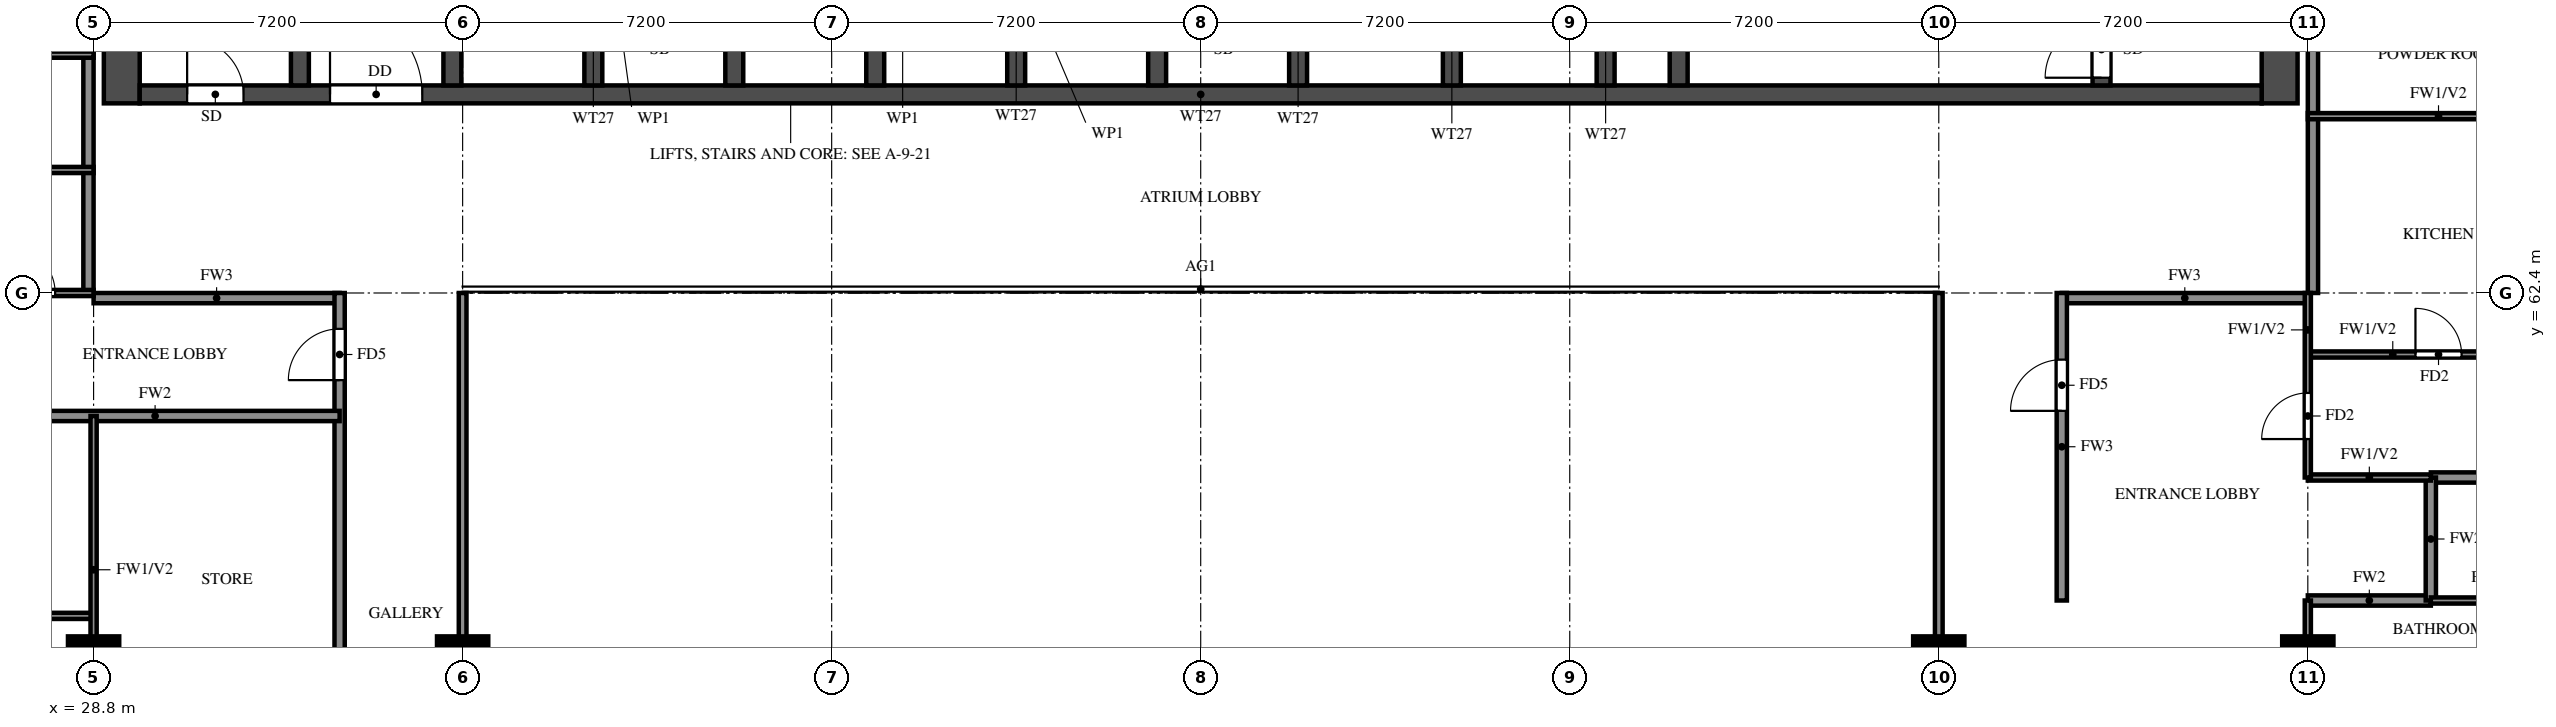
"""IFC4 building model, lengths in metres.
Left out: names, types, materials, properties, quantities, classifications, styles, units other than length and angle.
Written with IfcOpenShell. Run it as: python <this file> out.ifc"""

import sys

from ifc_helpers import new_model, si_unit, direction, frame, frame_2d, origin, origin_2d, place, context, subcontext, project, spatial, rectangle, extrude, source, transform, mapped, element, fill, save


model = new_model("IFC4")
c1 = context("Model", 3, precision=1e-05, world=origin(), true_north=direction((0.0, 1.0)))
c2 = subcontext(c1, "Body", "Model", "MODEL_VIEW")
j1 = project(units=[si_unit("LENGTHUNIT", "METRE"), si_unit("PLANEANGLEUNIT", "RADIAN")], contexts=[c1])
p1 = place(None, origin())
s1 = spatial("IfcSite", under=j1, at=p1, CompositionType="ELEMENT")
p2 = place(p1, origin())
s2 = spatial("IfcBuilding", under=s1, at=p2, CompositionType="ELEMENT")
p3 = place(p2, frame((0.0, 0.0, 146.5)))
s3 = spatial("IfcBuildingStorey", under=s2, at=p3, CompositionType="ELEMENT", Elevation=146.5)
m1 = source(origin(), c2, "Body", "SweptSolid", [
    extrude(rectangle(XDim=1.0, YDim=1.0, at=origin_2d()), origin(), (0.0, 0.0, 1.0), 3.2),
])
for number, where, z_axis, x_axis in (
    (1, (28.8, 55.2, 0.0), (0.0, 0.0, 1.0), (1.0, 0.0, 0.0)),
    (2, (36.0, 55.2, 0.0), (0.0, 0.0, 1.0), (1.0, 0.0, 0.0)),
    (3, (64.8, 55.2, 0.0), (0.0, 0.0, 1.0), (1.0, 0.0, 0.0)),
    (4, (72.0, 55.2, 0.0), (0.0, 0.0, 1.0), (1.0, 0.0, 0.0)),
):
    element("IfcColumn", number, at=place(p3, frame(where, z_axis=z_axis, x_axis=x_axis)), inside=s3, PredefinedType="COLUMN", context=c2, shape_type="MappedRepresentation", body=[
        mapped(m1, transform((0.0, 0.0, 0.0))),
    ])
for number, where, z_axis, x_axis in (
    (5, (29.35, 66.1, 0.0), (0.0, 0.0, 1.0), (0.0, 1.0, 0.0)),
    (6, (71.45, 66.1, 0.0), (0.0, 0.0, 1.0), (0.0, 1.0, 0.0)),
):
    element("IfcWall", number, at=place(p3, frame(where, z_axis=z_axis, x_axis=x_axis)), inside=s3, PredefinedType="SHEAR", context=c2, shape_type="SweptSolid", body=[
        extrude(rectangle(XDim=11.9, YDim=0.7, at=frame_2d((5.95, 0.0))), origin(), (0.0, 0.0, 1.0), 3.2),
    ])
p4 = place(p3, frame((29.7, 66.275, 0.0), z_axis=(0.0, 0.0, 1.0), x_axis=(1.0, 0.0, 0.0)))
e7 = element("IfcWall", 7, at=p4, inside=s3, PredefinedType="SHEAR", context=c2, shape_type="SweptSolid", body=[
    extrude(rectangle(XDim=41.4, YDim=0.35, at=frame_2d((20.7, 0.0))), origin(), (0.0, 0.0, 1.0), 3.2),
])
p5 = place(p4, frame((0.925, 0.0, 0.0)))
e8 = element("IfcOpeningElement", 8, at=p5, cuts=e7, PredefinedType="OPENING", context=c2, shape_type="SweptSolid", body=[
    extrude(rectangle(XDim=1.1, YDim=2.1, at=frame_2d((0.55, 1.05))), frame((0.0, 0.185, 0.0), z_axis=(0.0, -1.0, 0.0), x_axis=(1.0, 0.0, 0.0)), (0.0, 0.0, 1.0), 0.37),
])
p6 = place(p4, frame((3.712, 0.0, 0.0)))
e9 = element("IfcOpeningElement", 9, at=p6, cuts=e7, PredefinedType="OPENING", context=c2, shape_type="SweptSolid", body=[
    extrude(rectangle(XDim=1.8, YDim=2.1, at=frame_2d((0.9, 1.05))), frame((0.0, 0.185, 0.0), z_axis=(0.0, -1.0, 0.0), x_axis=(1.0, 0.0, 0.0)), (0.0, 0.0, 1.0), 0.37),
])
p7 = place(p3, frame((32.825, 66.45, 0.0), z_axis=(0.0, 0.0, 1.0), x_axis=(0.0, 1.0, 0.0)))
e10 = element("IfcWall", 10, at=p7, inside=s3, PredefinedType="SHEAR", context=c2, shape_type="SweptSolid", body=[
    extrude(rectangle(XDim=10.85, YDim=0.35, at=frame_2d((5.425, 0.0))), origin(), (0.0, 0.0, 1.0), 3.2),
])
p8 = place(p3, frame((67.975, 66.45, 0.0), z_axis=(0.0, 0.0, 1.0), x_axis=(0.0, 1.0, 0.0)))
e11 = element("IfcWall", 11, at=p8, inside=s3, PredefinedType="SHEAR", context=c2, shape_type="SweptSolid", body=[
    extrude(rectangle(XDim=10.85, YDim=0.35, at=frame_2d((5.425, 0.0))), origin(), (0.0, 0.0, 1.0), 3.2),
])
p9 = place(p8, frame((0.15, 0.0, 0.0)))
e12 = element("IfcOpeningElement", 12, at=p9, cuts=e11, PredefinedType="OPENING", context=c2, shape_type="SweptSolid", body=[
    extrude(rectangle(XDim=1.1, YDim=2.1, at=frame_2d((0.55, 1.05))), frame((0.0, 0.185, 0.0), z_axis=(0.0, -1.0, 0.0), x_axis=(1.0, 0.0, 0.0)), (0.0, 0.0, 1.0), 0.37),
])
p10 = place(p3, frame((59.725, 66.45, 0.0), z_axis=(0.0, 0.0, 1.0), x_axis=(0.0, 1.0, 0.0)))
e13 = element("IfcWall", 13, at=p10, inside=s3, PredefinedType="SHEAR", context=c2, shape_type="SweptSolid", body=[
    extrude(rectangle(XDim=6.125, YDim=0.35, at=frame_2d((3.062, 0.0))), origin(), (0.0, 0.0, 1.0), 3.2),
])
p11 = place(p10, frame((3.85, 0.0, 0.0)))
e14 = element("IfcOpeningElement", 14, at=p11, cuts=e13, PredefinedType="OPENING", context=c2, shape_type="SweptSolid", body=[
    extrude(rectangle(XDim=1.2, YDim=2.1, at=frame_2d((0.6, 1.05))), frame((0.0, 0.185, 0.0), z_axis=(0.0, -1.0, 0.0), x_axis=(1.0, 0.0, 0.0)), (0.0, 0.0, 1.0), 0.37),
])
for number, where, z_axis, x_axis in (
    (15, (35.8, 66.45, 0.0), (0.0, 0.0, 1.0), (0.0, 1.0, 0.0)),
    (16, (38.55, 66.45, 0.0), (0.0, 0.0, 1.0), (0.0, 1.0, 0.0)),
    (17, (41.3, 66.45, 0.0), (0.0, 0.0, 1.0), (0.0, 1.0, 0.0)),
    (18, (44.05, 66.45, 0.0), (0.0, 0.0, 1.0), (0.0, 1.0, 0.0)),
    (19, (46.8, 66.45, 0.0), (0.0, 0.0, 1.0), (0.0, 1.0, 0.0)),
    (20, (49.55, 66.45, 0.0), (0.0, 0.0, 1.0), (0.0, 1.0, 0.0)),
    (21, (52.3, 66.45, 0.0), (0.0, 0.0, 1.0), (0.0, 1.0, 0.0)),
    (22, (55.3, 66.45, 0.0), (0.0, 0.0, 1.0), (0.0, 1.0, 0.0)),
    (23, (58.3, 66.45, 0.0), (0.0, 0.0, 1.0), (0.0, 1.0, 0.0)),
):
    element("IfcWall", number, at=place(p3, frame(where, z_axis=z_axis, x_axis=x_axis)), inside=s3, PredefinedType="SHEAR", context=c2, shape_type="SweptSolid", body=[
        extrude(rectangle(XDim=2.425, YDim=0.35, at=frame_2d((1.212, 0.0))), origin(), (0.0, 0.0, 1.0), 3.2),
    ])
for number, where, z_axis, x_axis in (
    (24, (28.8, 62.3, 0.0), (0.0, 0.0, 1.0), (1.0, 0.0, 0.0)),
    (25, (67.2, 62.3, 0.0), (0.0, 0.0, 1.0), (1.0, 0.0, 0.0)),
):
    element("IfcWall", number, at=place(p3, frame(where, z_axis=z_axis, x_axis=x_axis)), inside=s3, PredefinedType="SOLIDWALL", context=c2, shape_type="SweptSolid", body=[
        extrude(rectangle(XDim=4.8, YDim=0.2, at=frame_2d((2.4, 0.0))), origin(), (0.0, 0.0, 1.0), 3.2),
    ])
p12 = place(p3, frame((28.7, 62.4, 0.0), z_axis=(0.0, 0.0, 1.0), x_axis=(0.0, 1.0, 0.0)))
e26 = element("IfcWall", 26, at=p12, inside=s3, PredefinedType="SOLIDWALL", context=c2, shape_type="SweptSolid", body=[
    extrude(rectangle(XDim=15.6, YDim=0.2, at=frame_2d((7.8, 0.0))), origin(), (0.0, 0.0, 1.0), 3.2),
])
p13 = place(p3, frame((33.6, 45.6, 0.0), z_axis=(0.0, 0.0, 1.0), x_axis=(0.0, 1.0, 0.0)))
e27 = element("IfcWall", 27, at=p13, inside=s3, PredefinedType="SOLIDWALL", context=c2, shape_type="SweptSolid", body=[
    extrude(rectangle(XDim=16.8, YDim=0.2, at=frame_2d((8.4, 0.0))), origin(), (0.0, 0.0, 1.0), 3.2),
])
p14 = place(p13, frame((0.7, 0.0, 0.0)))
e28 = element("IfcOpeningElement", 28, at=p14, cuts=e27, PredefinedType="OPENING", context=c2, shape_type="SweptSolid", body=[
    extrude(rectangle(XDim=1.0, YDim=2.1, at=frame_2d((0.5, 1.05))), frame((0.0, 0.11, 0.0), z_axis=(0.0, -1.0, 0.0), x_axis=(1.0, 0.0, 0.0)), (0.0, 0.0, 1.0), 0.22),
])
p15 = place(p13, frame((6.7, 0.0, 0.0)))
e29 = element("IfcOpeningElement", 29, at=p15, cuts=e27, PredefinedType="OPENING", context=c2, shape_type="SweptSolid", body=[
    extrude(rectangle(XDim=1.0, YDim=2.1, at=frame_2d((0.5, 1.05))), frame((0.0, 0.11, 0.0), z_axis=(0.0, -1.0, 0.0), x_axis=(1.0, 0.0, 0.0)), (0.0, 0.0, 1.0), 0.22),
])
p16 = place(p13, frame((15.1, 0.0, 0.0)))
e30 = element("IfcOpeningElement", 30, at=p16, cuts=e27, PredefinedType="OPENING", context=c2, shape_type="SweptSolid", body=[
    extrude(rectangle(XDim=1.0, YDim=2.1, at=frame_2d((0.5, 1.05))), frame((0.0, 0.11, 0.0), z_axis=(0.0, -1.0, 0.0), x_axis=(1.0, 0.0, 0.0)), (0.0, 0.0, 1.0), 0.22),
])
p17 = place(p3, frame((67.2, 56.4, 0.0), z_axis=(0.0, 0.0, 1.0), x_axis=(0.0, 1.0, 0.0)))
e31 = element("IfcWall", 31, at=p17, inside=s3, PredefinedType="SOLIDWALL", context=c2, shape_type="SweptSolid", body=[
    extrude(rectangle(XDim=6.0, YDim=0.2, at=frame_2d((3.0, 0.0))), origin(), (0.0, 0.0, 1.0), 3.2),
])
p18 = place(p17, frame((3.7, 0.0, 0.0)))
e32 = element("IfcOpeningElement", 32, at=p18, cuts=e31, PredefinedType="OPENING", context=c2, shape_type="SweptSolid", body=[
    extrude(rectangle(XDim=1.0, YDim=2.1, at=frame_2d((0.5, 1.05))), frame((0.0, 0.11, 0.0), z_axis=(0.0, -1.0, 0.0), x_axis=(1.0, 0.0, 0.0)), (0.0, 0.0, 1.0), 0.22),
])
p19 = place(p3, frame((72.1, 62.4, 0.0), z_axis=(0.0, 0.0, 1.0), x_axis=(0.0, 1.0, 0.0)))
e33 = element("IfcWall", 33, at=p19, inside=s3, PredefinedType="SOLIDWALL", context=c2, shape_type="SweptSolid", body=[
    extrude(rectangle(XDim=15.6, YDim=0.2, at=frame_2d((7.8, 0.0))), origin(), (0.0, 0.0, 1.0), 3.2),
])
p20 = place(p3, frame((72.0, 56.4, 0.0), z_axis=(0.0, 0.0, 1.0), x_axis=(1.0, 0.0, 0.0)))
e34 = element("IfcWall", 34, at=p20, inside=s3, PredefinedType="SOLIDWALL", context=c2, shape_type="SweptSolid", body=[
    extrude(rectangle(XDim=2.4, YDim=0.2, at=frame_2d((1.2, 0.0))), origin(), (0.0, 0.0, 1.0), 3.2),
])
p21 = place(p3, frame((74.4, 58.8, 0.0), z_axis=(0.0, 0.0, 1.0), x_axis=(1.0, 0.0, 0.0)))
e35 = element("IfcWall", 35, at=p21, inside=s3, PredefinedType="SOLIDWALL", context=c2, shape_type="SweptSolid", body=[
    extrude(rectangle(XDim=11.875, YDim=0.2, at=frame_2d((5.938, 0.0))), origin(), (0.0, 0.0, 1.0), 2.3),
])
p22 = place(p3, frame((26.4, 60.0, 0.0), z_axis=(0.0, 0.0, 1.0), x_axis=(1.0, 0.0, 0.0)))
e36 = element("IfcWall", 36, at=p22, inside=s3, PredefinedType="SOLIDWALL", context=c2, shape_type="SweptSolid", body=[
    extrude(rectangle(XDim=7.2, YDim=0.2, at=frame_2d((3.6, 0.0))), origin(), (0.0, 0.0, 1.0), 3.2),
])
p23 = place(p3, frame((74.4, 56.4, 0.0), z_axis=(0.0, 0.0, 1.0), x_axis=(0.0, 1.0, 0.0)))
e37 = element("IfcWall", 37, at=p23, inside=s3, PredefinedType="SOLIDWALL", context=c2, shape_type="SweptSolid", body=[
    extrude(rectangle(XDim=2.4, YDim=0.2, at=frame_2d((1.2, 0.0))), origin(), (0.0, 0.0, 1.0), 3.2),
])
p24 = place(p3, frame((23.7, 56.1, 0.0), z_axis=(0.0, 0.0, 1.0), x_axis=(1.0, 0.0, 0.0)))
e38 = element("IfcWall", 38, at=p24, inside=s3, PredefinedType="PARTITIONING", context=c2, shape_type="SweptSolid", body=[
    extrude(rectangle(XDim=5.1, YDim=0.12, at=frame_2d((2.55, 0.0))), origin(), (0.0, 0.0, 1.0), 3.2),
])
p25 = place(p3, frame((74.4, 56.4, 0.0), z_axis=(0.0, 0.0, 1.0), x_axis=(1.0, 0.0, 0.0)))
e39 = element("IfcWall", 39, at=p25, inside=s3, PredefinedType="PARTITIONING", context=c2, shape_type="SweptSolid", body=[
    extrude(rectangle(XDim=2.7, YDim=0.12, at=frame_2d((1.35, 0.0))), origin(), (0.0, 0.0, 1.0), 3.2),
])
p26 = place(p3, frame((72.0, 58.8, 0.0), z_axis=(0.0, 0.0, 1.0), x_axis=(1.0, 0.0, 0.0)))
e40 = element("IfcWall", 40, at=p26, inside=s3, PredefinedType="PARTITIONING", context=c2, shape_type="SweptSolid", body=[
    extrude(rectangle(XDim=2.4, YDim=0.12, at=frame_2d((1.2, 0.0))), origin(), (0.0, 0.0, 1.0), 3.2),
])
p27 = place(p3, frame((72.0, 61.2, 0.0), z_axis=(0.0, 0.0, 1.0), x_axis=(1.0, 0.0, 0.0)))
e41 = element("IfcWall", 41, at=p27, inside=s3, PredefinedType="PARTITIONING", context=c2, shape_type="SweptSolid", body=[
    extrude(rectangle(XDim=5.1, YDim=0.12, at=frame_2d((2.55, 0.0))), origin(), (0.0, 0.0, 1.0), 3.2),
])
p28 = place(p27, frame((2.1, 0.0, 0.0)))
e42 = element("IfcOpeningElement", 42, at=p28, cuts=e41, PredefinedType="OPENING", context=c2, shape_type="SweptSolid", body=[
    extrude(rectangle(XDim=0.9, YDim=2.1, at=frame_2d((0.45, 1.05))), frame((0.0, 0.07, 0.0), z_axis=(0.0, -1.0, 0.0), x_axis=(1.0, 0.0, 0.0)), (0.0, 0.0, 1.0), 0.14),
])
p29 = place(p3, frame((26.4, 62.4, 0.0), z_axis=(0.0, 0.0, 1.0), x_axis=(1.0, 0.0, 0.0)))
e43 = element("IfcWall", 43, at=p29, inside=s3, PredefinedType="PARTITIONING", context=c2, shape_type="SweptSolid", body=[
    extrude(rectangle(XDim=2.4, YDim=0.12, at=frame_2d((1.2, 0.0))), origin(), (0.0, 0.0, 1.0), 3.2),
])
p30 = place(p29, frame((0.75, 0.0, 0.0)))
e44 = element("IfcOpeningElement", 44, at=p30, cuts=e43, PredefinedType="OPENING", context=c2, shape_type="SweptSolid", body=[
    extrude(rectangle(XDim=0.9, YDim=2.1, at=frame_2d((0.45, 1.05))), frame((0.0, 0.07, 0.0), z_axis=(0.0, -1.0, 0.0), x_axis=(1.0, 0.0, 0.0)), (0.0, 0.0, 1.0), 0.14),
])
p31 = place(p3, frame((23.7, 64.8, 0.0), z_axis=(0.0, 0.0, 1.0), x_axis=(1.0, 0.0, 0.0)))
e45 = element("IfcWall", 45, at=p31, inside=s3, PredefinedType="PARTITIONING", context=c2, shape_type="SweptSolid", body=[
    extrude(rectangle(XDim=5.1, YDim=0.12, at=frame_2d((2.55, 0.0))), origin(), (0.0, 0.0, 1.0), 3.2),
])
p32 = place(p31, frame((2.1, 0.0, 0.0)))
e46 = element("IfcOpeningElement", 46, at=p32, cuts=e45, PredefinedType="OPENING", context=c2, shape_type="SweptSolid", body=[
    extrude(rectangle(XDim=0.9, YDim=2.1, at=frame_2d((0.45, 1.05))), frame((0.0, 0.07, 0.0), z_axis=(0.0, -1.0, 0.0), x_axis=(1.0, 0.0, 0.0)), (0.0, 0.0, 1.0), 0.14),
])
for number, where, z_axis, x_axis in (
    (47, (72.0, 65.85, 0.0), (0.0, 0.0, 1.0), (1.0, 0.0, 0.0)),
    (48, (23.7, 67.05, 0.0), (0.0, 0.0, 1.0), (1.0, 0.0, 0.0)),
):
    element("IfcWall", number, at=place(p3, frame(where, z_axis=z_axis, x_axis=x_axis)), inside=s3, PredefinedType="PARTITIONING", context=c2, shape_type="SweptSolid", body=[
        extrude(rectangle(XDim=5.1, YDim=0.12, at=frame_2d((2.55, 0.0))), origin(), (0.0, 0.0, 1.0), 3.2),
    ])
p33 = place(p3, frame((28.8, 54.0, 0.0), z_axis=(0.0, 0.0, 1.0), x_axis=(0.0, 1.0, 0.0)))
e49 = element("IfcWall", 49, at=p33, inside=s3, PredefinedType="PARTITIONING", context=c2, shape_type="SweptSolid", body=[
    extrude(rectangle(XDim=6.0, YDim=0.12, at=frame_2d((3.0, 0.0))), origin(), (0.0, 0.0, 1.0), 3.2),
])
p34 = place(p3, frame((72.0, 54.0, 0.0), z_axis=(0.0, 0.0, 1.0), x_axis=(0.0, 1.0, 0.0)))
e50 = element("IfcWall", 50, at=p34, inside=s3, PredefinedType="PARTITIONING", context=c2, shape_type="SweptSolid", body=[
    extrude(rectangle(XDim=2.4, YDim=0.12, at=frame_2d((1.2, 0.0))), origin(), (0.0, 0.0, 1.0), 3.2),
])
p35 = place(p3, frame((72.0, 58.8, 0.0), z_axis=(0.0, 0.0, 1.0), x_axis=(0.0, 1.0, 0.0)))
e51 = element("IfcWall", 51, at=p35, inside=s3, PredefinedType="PARTITIONING", context=c2, shape_type="SweptSolid", body=[
    extrude(rectangle(XDim=3.6, YDim=0.12, at=frame_2d((1.8, 0.0))), origin(), (0.0, 0.0, 1.0), 3.2),
])
p36 = place(p35, frame((0.75, 0.0, 0.0)))
e52 = element("IfcOpeningElement", 52, at=p36, cuts=e51, PredefinedType="OPENING", context=c2, shape_type="SweptSolid", body=[
    extrude(rectangle(XDim=0.9, YDim=2.1, at=frame_2d((0.45, 1.05))), frame((0.0, 0.07, 0.0), z_axis=(0.0, -1.0, 0.0), x_axis=(1.0, 0.0, 0.0)), (0.0, 0.0, 1.0), 0.14),
])
for number, where, z_axis, x_axis in (
    (53, (36.0, 48.0, 0.0), (0.0, 0.0, 1.0), (0.0, 1.0, 0.0)),
    (54, (64.8, 48.0, 0.0), (0.0, 0.0, 1.0), (0.0, 1.0, 0.0)),
):
    element("IfcWall", number, at=place(p3, frame(where, z_axis=z_axis, x_axis=x_axis)), inside=s3, PredefinedType="SOLIDWALL", context=c2, shape_type="SweptSolid", body=[
        extrude(rectangle(XDim=14.4, YDim=0.15, at=frame_2d((7.2, 0.0))), origin(), (0.0, 0.0, 1.0), 2.3),
    ])
p37 = place(p5, origin())
e55 = element("IfcDoor", 55, at=p37, inside=s3, OperationType="SINGLE_SWING_LEFT", PredefinedType="DOOR", context=c2, shape_type="SweptSolid", body=[
    extrude(rectangle(XDim=1.1, YDim=2.1, at=frame_2d((0.55, 1.05))), frame((0.0, 0.025, 0.0), z_axis=(0.0, -1.0, 0.0), x_axis=(1.0, 0.0, 0.0)), (0.0, 0.0, 1.0), 0.05),
])
fill(e8, e55)
p38 = place(p9, origin())
e56 = element("IfcDoor", 56, at=p38, inside=s3, OperationType="SINGLE_SWING_LEFT", PredefinedType="DOOR", context=c2, shape_type="SweptSolid", body=[
    extrude(rectangle(XDim=1.1, YDim=2.1, at=frame_2d((0.55, 1.05))), frame((0.0, 0.025, 0.0), z_axis=(0.0, -1.0, 0.0), x_axis=(1.0, 0.0, 0.0)), (0.0, 0.0, 1.0), 0.05),
])
fill(e12, e56)
p39 = place(p6, origin())
e57 = element("IfcDoor", 57, at=p39, inside=s3, OperationType="DOUBLE_DOOR_SINGLE_SWING", PredefinedType="DOOR", context=c2, shape_type="SweptSolid", body=[
    extrude(rectangle(XDim=1.8, YDim=2.1, at=frame_2d((0.9, 1.05))), frame((0.0, 0.025, 0.0), z_axis=(0.0, -1.0, 0.0), x_axis=(1.0, 0.0, 0.0)), (0.0, 0.0, 1.0), 0.05),
])
fill(e9, e57)
p40 = place(p30, origin())
e58 = element("IfcDoor", 58, at=p40, inside=s3, OperationType="SINGLE_SWING_LEFT", PredefinedType="DOOR", context=c2, shape_type="SweptSolid", body=[
    extrude(rectangle(XDim=0.9, YDim=2.1, at=frame_2d((0.45, 1.05))), frame((0.0, 0.025, 0.0), z_axis=(0.0, -1.0, 0.0), x_axis=(1.0, 0.0, 0.0)), (0.0, 0.0, 1.0), 0.05),
])
fill(e44, e58)
p41 = place(p16, origin())
e59 = element("IfcDoor", 59, at=p41, inside=s3, OperationType="SINGLE_SWING_RIGHT", PredefinedType="DOOR", context=c2, shape_type="SweptSolid", body=[
    extrude(rectangle(XDim=1.0, YDim=2.1, at=frame_2d((0.5, 1.05))), frame((0.0, 0.025, 0.0), z_axis=(0.0, -1.0, 0.0), x_axis=(1.0, 0.0, 0.0)), (0.0, 0.0, 1.0), 0.05),
])
fill(e30, e59)
p42 = place(p36, origin())
e60 = element("IfcDoor", 60, at=p42, inside=s3, OperationType="SINGLE_SWING_LEFT", PredefinedType="DOOR", context=c2, shape_type="SweptSolid", body=[
    extrude(rectangle(XDim=0.9, YDim=2.1, at=frame_2d((0.45, 1.05))), frame((0.0, 0.025, 0.0), z_axis=(0.0, -1.0, 0.0), x_axis=(1.0, 0.0, 0.0)), (0.0, 0.0, 1.0), 0.05),
])
fill(e52, e60)
p43 = place(p18, origin())
e61 = element("IfcDoor", 61, at=p43, inside=s3, OperationType="SINGLE_SWING_LEFT", PredefinedType="DOOR", context=c2, shape_type="SweptSolid", body=[
    extrude(rectangle(XDim=1.0, YDim=2.1, at=frame_2d((0.5, 1.05))), frame((0.0, 0.025, 0.0), z_axis=(0.0, -1.0, 0.0), x_axis=(1.0, 0.0, 0.0)), (0.0, 0.0, 1.0), 0.05),
])
fill(e32, e61)
p44 = place(p28, origin())
e62 = element("IfcDoor", 62, at=p44, inside=s3, OperationType="SINGLE_SWING_LEFT", PredefinedType="DOOR", context=c2, shape_type="SweptSolid", body=[
    extrude(rectangle(XDim=0.9, YDim=2.1, at=frame_2d((0.45, 1.05))), frame((0.0, 0.025, 0.0), z_axis=(0.0, -1.0, 0.0), x_axis=(1.0, 0.0, 0.0)), (0.0, 0.0, 1.0), 0.05),
])
fill(e42, e62)
save(model, sys.argv[1])
